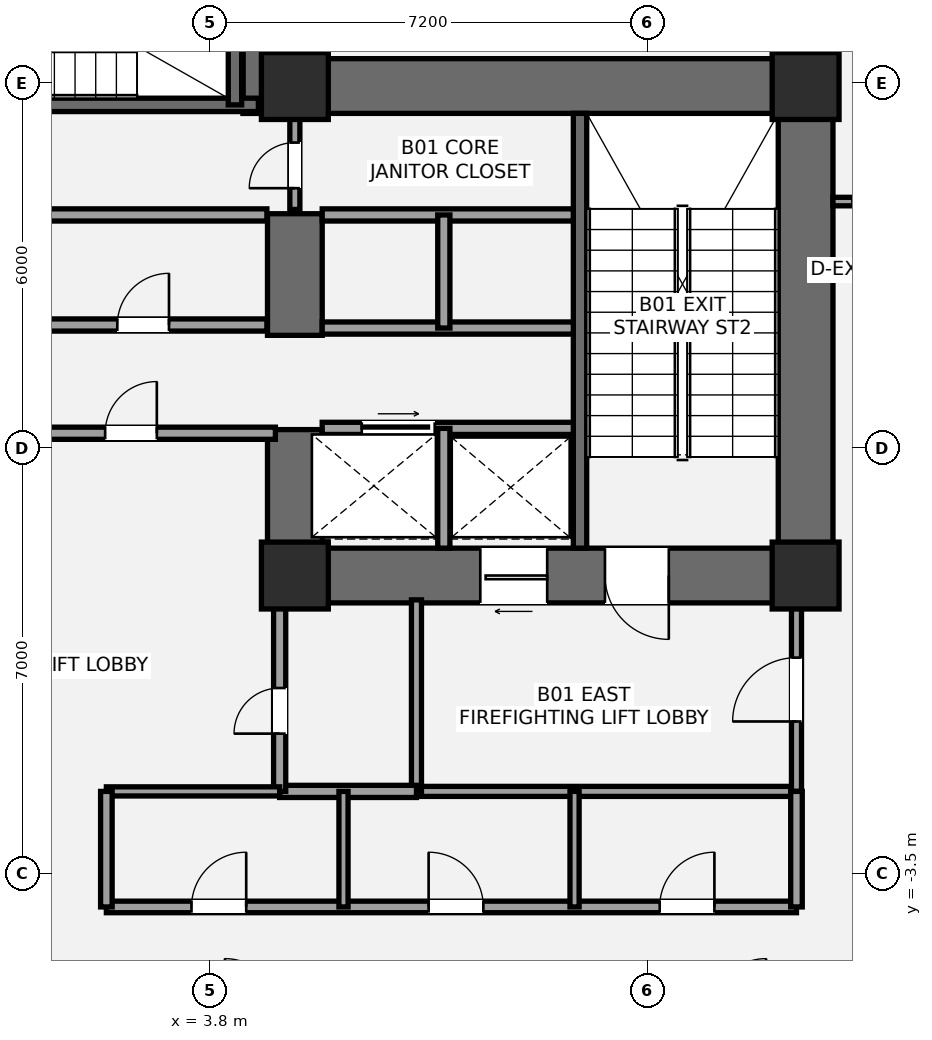
"""IFC4 building model, lengths in metres.
Left out: names, types, materials, properties, quantities, classifications, styles, units other than length and angle.
Written with IfcOpenShell. Run it as: python <this file> out.ifc"""

import sys

from ifc_helpers import new_model, si_unit, direction, frame, frame_2d, origin, origin_2d, place, context, subcontext, project, spatial, rectangle, extrude, element, fill, save


model = new_model("IFC4")
c1 = context("Model", 3, precision=1e-05, world=origin(), true_north=direction((0.0, 1.0)))
c2 = subcontext(c1, "Body", "Model", "MODEL_VIEW")
j1 = project(units=[si_unit("LENGTHUNIT", "METRE"), si_unit("PLANEANGLEUNIT", "RADIAN")], contexts=[c1])
p1 = place(None, origin())
s1 = spatial("IfcSite", under=j1, at=p1, CompositionType="ELEMENT")
p2 = place(p1, origin())
s2 = spatial("IfcBuilding", under=s1, at=p2, CompositionType="ELEMENT")
p3 = place(p2, frame((0.0, 0.0, -4.4)))
s3 = spatial("IfcBuildingStorey", under=s2, at=p3, CompositionType="ELEMENT", Elevation=-4.4)
p4 = place(p3, frame((13.6, 0.95, 0.0), z_axis=(0.0, 0.0, 1.0), x_axis=(0.0, 1.0, 0.0)))
e1 = element("IfcWall", 1, at=p4, inside=s3, PredefinedType="SHEAR", context=c2, shape_type="SweptSolid", body=[
    extrude(rectangle(XDim=8.95, YDim=0.9, at=frame_2d((4.475, 0.0))), origin(), (0.0, 0.0, 1.0), 4.4),
])
p5 = place(p3, frame((4.35, 9.45, 0.0), z_axis=(0.0, 0.0, 1.0), x_axis=(1.0, 0.0, 0.0)))
e2 = element("IfcWall", 2, at=p5, inside=s3, PredefinedType="SHEAR", context=c2, shape_type="SweptSolid", body=[
    extrude(rectangle(XDim=9.7, YDim=0.9, at=frame_2d((4.85, 0.0))), origin(), (0.0, 0.0, 1.0), 4.4),
])
p6 = place(p3, frame((14.05, 1.4, 0.0), z_axis=(0.0, 0.0, 1.0), x_axis=(-1.0, 0.0, 0.0)))
e3 = element("IfcWall", 3, at=p6, inside=s3, PredefinedType="SHEAR", context=c2, shape_type="SweptSolid", body=[
    extrude(rectangle(XDim=9.3, YDim=0.9, at=frame_2d((4.65, 0.0))), origin(), (0.0, 0.0, 1.0), 4.4),
])
p7 = place(p6, frame((2.7, 0.0, 0.0)))
e4 = element("IfcOpeningElement", 4, at=p7, cuts=e3, PredefinedType="OPENING", context=c2, shape_type="SweptSolid", body=[
    extrude(rectangle(XDim=1.05, YDim=2.15, at=frame_2d((0.525, 1.075))), frame((0.0, 0.46, 0.0), z_axis=(0.0, -1.0, 0.0), x_axis=(1.0, 0.0, 0.0)), (0.0, 0.0, 1.0), 0.92),
])
p8 = place(p6, frame((4.7, 0.0, 0.0)))
e5 = element("IfcOpeningElement", 5, at=p8, cuts=e3, PredefinedType="OPENING", context=c2, shape_type="SweptSolid", body=[
    extrude(rectangle(XDim=1.1, YDim=2.2, at=frame_2d((0.55, 1.1))), frame((0.0, 0.46, 0.0), z_axis=(0.0, -1.0, 0.0), x_axis=(1.0, 0.0, 0.0)), (0.0, 0.0, 1.0), 0.92),
])
p9 = place(p3, frame((5.2, 0.95, 0.0), z_axis=(0.0, 0.0, 1.0), x_axis=(0.0, 1.0, 0.0)))
e6 = element("IfcWall", 6, at=p9, inside=s3, PredefinedType="SHEAR", context=c2, shape_type="SweptSolid", body=[
    extrude(rectangle(XDim=2.85, YDim=0.9, at=frame_2d((1.425, 0.0))), origin(), (0.0, 0.0, 1.0), 4.4),
])
p10 = place(p3, frame((5.2, 5.35, 0.0), z_axis=(0.0, 0.0, 1.0), x_axis=(0.0, 1.0, 0.0)))
e7 = element("IfcWall", 7, at=p10, inside=s3, PredefinedType="SHEAR", context=c2, shape_type="SweptSolid", body=[
    extrude(rectangle(XDim=2.0, YDim=0.9, at=frame_2d((1.0, 0.0))), origin(), (0.0, 0.0, 1.0), 4.4),
])
p11 = place(p3, frame((9.89, 1.85, 0.0), z_axis=(0.0, 0.0, 1.0), x_axis=(0.0, 1.0, 0.0)))
e8 = element("IfcWall", 8, at=p11, inside=s3, PredefinedType="SHEAR", context=c2, shape_type="SweptSolid", body=[
    extrude(rectangle(XDim=7.15, YDim=0.22, at=frame_2d((3.575, 0.0))), origin(), (0.0, 0.0, 1.0), 4.4),
])
p12 = place(p3, frame((4.8, 9.0, 0.0), z_axis=(0.0, 0.0, 1.0), x_axis=(0.0, 1.0, 0.0)))
e9 = element("IfcWall", 9, at=p12, inside=s3, PredefinedType="SHEAR", context=c2, shape_type="SweptSolid", body=[
    extrude(rectangle(XDim=4.3, YDim=0.9, at=frame_2d((2.15, 0.0))), origin(), (0.0, 0.0, 1.0), 4.4),
])
p13 = place(p3, frame((-4.7, 9.14, 0.0), z_axis=(0.0, 0.0, 1.0), x_axis=(1.0, 0.0, 0.0)))
e10 = element("IfcWall", 10, at=p13, inside=s3, PredefinedType="SHEAR", context=c2, shape_type="SweptSolid", body=[
    extrude(rectangle(XDim=9.3, YDim=0.22, at=frame_2d((4.65, 0.0))), origin(), (0.0, 0.0, 1.0), 4.4),
])
p14 = place(p13, frame((1.15, 0.0, 0.0)))
e11 = element("IfcOpeningElement", 11, at=p14, cuts=e10, PredefinedType="OPENING", context=c2, shape_type="SweptSolid", body=[
    extrude(rectangle(XDim=1.05, YDim=2.15, at=frame_2d((0.525, 1.075))), frame((0.0, 0.12, 0.0), z_axis=(0.0, -1.0, 0.0), x_axis=(1.0, 0.0, 0.0)), (0.0, 0.0, 1.0), 0.24),
])
p15 = place(p3, frame((4.215, 9.14, 0.0), z_axis=(0.0, 0.0, 1.0), x_axis=(0.0, 1.0, 0.0)))
e12 = element("IfcWall", 12, at=p15, inside=s3, PredefinedType="SHEAR", context=c2, shape_type="SweptSolid", body=[
    extrude(rectangle(XDim=3.26, YDim=0.22, at=frame_2d((1.63, 0.0))), origin(), (0.0, 0.0, 1.0), 4.4),
])
for number, where, z_axis, x_axis in (
    (13, (5.2, 1.4, 0.0), (0.0, 0.0, 1.0), (1.0, 0.0, 0.0)),
    (14, (5.2, 9.45, 0.0), (0.0, 0.0, 1.0), (1.0, 0.0, 0.0)),
    (15, (13.6, 1.4, 0.0), (0.0, 0.0, 1.0), (1.0, 0.0, 0.0)),
    (16, (13.6, 9.45, 0.0), (0.0, 0.0, 1.0), (1.0, 0.0, 0.0)),
):
    element("IfcColumn", number, at=place(p3, frame(where, z_axis=z_axis, x_axis=x_axis)), inside=s3, PredefinedType="COLUMN", context=c2, shape_type="SweptSolid", body=[
        extrude(rectangle(XDim=1.1, YDim=1.1, at=origin_2d()), origin(), (0.0, 0.0, 1.0), 4.4),
    ])
p16 = place(p3, frame((7.2, -2.15, 0.0), z_axis=(0.0, 0.0, 1.0), x_axis=(1.0, 0.0, 0.0)))
e17 = element("IfcWall", 17, at=p16, inside=s3, PredefinedType="PARTITIONING", context=c2, shape_type="SweptSolid", body=[
    extrude(rectangle(XDim=6.25, YDim=0.165, at=frame_2d((3.125, 0.0))), origin(), (0.0, 0.0, 1.0), 4.14),
])
p17 = place(p3, frame((7.2, -2.15, 0.0), z_axis=(0.0, 0.0, 1.0), x_axis=(0.0, 1.0, 0.0)))
e18 = element("IfcWall", 18, at=p17, inside=s3, PredefinedType="PARTITIONING", context=c2, shape_type="SweptSolid", body=[
    extrude(rectangle(XDim=3.15, YDim=0.165, at=frame_2d((1.575, 0.0))), origin(), (0.0, 0.0, 1.0), 4.14),
])
p18 = place(p3, frame((13.45, -2.15, 0.0), z_axis=(0.0, 0.0, 1.0), x_axis=(0.0, 1.0, 0.0)))
e19 = element("IfcWall", 19, at=p18, inside=s3, PredefinedType="PARTITIONING", context=c2, shape_type="SweptSolid", body=[
    extrude(rectangle(XDim=3.15, YDim=0.165, at=frame_2d((1.575, 0.0))), origin(), (0.0, 0.0, 1.0), 4.14),
])
p19 = place(p18, frame((1.15, 0.0, 0.0)))
e20 = element("IfcOpeningElement", 20, at=p19, cuts=e19, PredefinedType="OPENING", context=c2, shape_type="SweptSolid", body=[
    extrude(rectangle(XDim=1.05, YDim=2.15, at=frame_2d((0.525, 1.075))), frame((0.0, 0.093, 0.0), z_axis=(0.0, -1.0, 0.0), x_axis=(1.0, 0.0, 0.0)), (0.0, 0.0, 1.0), 0.185),
])
p20 = place(p3, frame((4.95, -2.15, 0.0), z_axis=(0.0, 0.0, 1.0), x_axis=(1.0, 0.0, 0.0)))
e21 = element("IfcWall", 21, at=p20, inside=s3, PredefinedType="SOLIDWALL", context=c2, shape_type="SweptSolid", body=[
    extrude(rectangle(XDim=2.25, YDim=0.2, at=frame_2d((1.125, 0.0))), origin(), (0.0, 0.0, 1.0), 4.14),
])
p21 = place(p3, frame((4.95, -2.15, 0.0), z_axis=(0.0, 0.0, 1.0), x_axis=(0.0, 1.0, 0.0)))
e22 = element("IfcWall", 22, at=p21, inside=s3, PredefinedType="SOLIDWALL", context=c2, shape_type="SweptSolid", body=[
    extrude(rectangle(XDim=3.15, YDim=0.2, at=frame_2d((1.575, 0.0))), origin(), (0.0, 0.0, 1.0), 3.508),
])
p22 = place(p21, frame((0.95, 0.0, 0.0)))
e23 = element("IfcOpeningElement", 23, at=p22, cuts=e22, PredefinedType="OPENING", context=c2, shape_type="SweptSolid", body=[
    extrude(rectangle(XDim=0.75, YDim=2.1, at=frame_2d((0.375, 1.05))), frame((0.0, 0.11, 0.0), z_axis=(0.0, -1.0, 0.0), x_axis=(1.0, 0.0, 0.0)), (0.0, 0.0, 1.0), 0.22),
])
p23 = place(p3, frame((5.65, 3.82, 0.0), z_axis=(0.0, 0.0, 1.0), x_axis=(1.0, 0.0, 0.0)))
e24 = element("IfcWall", 24, at=p23, inside=s3, PredefinedType="SOLIDWALL", context=c2, shape_type="SweptSolid", body=[
    extrude(rectangle(XDim=4.13, YDim=0.2, at=frame_2d((2.065, 0.0))), origin(), (0.0, 0.0, 1.0), 4.14),
])
p24 = place(p23, frame((0.65, 0.0, 0.0)))
e25 = element("IfcOpeningElement", 25, at=p24, cuts=e24, PredefinedType="OPENING", context=c2, shape_type="SweptSolid", body=[
    extrude(rectangle(XDim=1.2, YDim=2.2, at=frame_2d((0.6, 1.1))), frame((0.0, 0.11, 0.0), z_axis=(0.0, -1.0, 0.0), x_axis=(1.0, 0.0, 0.0)), (0.0, 0.0, 1.0), 0.22),
])
p25 = place(p3, frame((7.65, 1.85, 0.0), z_axis=(0.0, 0.0, 1.0), x_axis=(0.0, 1.0, 0.0)))
e26 = element("IfcWall", 26, at=p25, inside=s3, PredefinedType="SOLIDWALL", context=c2, shape_type="SweptSolid", body=[
    extrude(rectangle(XDim=1.97, YDim=0.2, at=frame_2d((0.985, 0.0))), origin(), (0.0, 0.0, 1.0), 4.14),
])
for number, where, z_axis, x_axis in (
    (27, (5.65, 5.47, 0.0), (0.0, 0.0, 1.0), (1.0, 0.0, 0.0)),
    (28, (5.65, 7.33, 0.0), (0.0, 0.0, 1.0), (1.0, 0.0, 0.0)),
):
    element("IfcWall", number, at=place(p3, frame(where, z_axis=z_axis, x_axis=x_axis)), inside=s3, PredefinedType="SOLIDWALL", context=c2, shape_type="SweptSolid", body=[
        extrude(rectangle(XDim=4.13, YDim=0.2, at=frame_2d((2.065, 0.0))), origin(), (0.0, 0.0, 1.0), 4.14),
    ])
p26 = place(p3, frame((7.65, 5.47, 0.0), z_axis=(0.0, 0.0, 1.0), x_axis=(0.0, 1.0, 0.0)))
e29 = element("IfcWall", 29, at=p26, inside=s3, PredefinedType="SOLIDWALL", context=c2, shape_type="SweptSolid", body=[
    extrude(rectangle(XDim=1.86, YDim=0.2, at=frame_2d((0.93, 0.0))), origin(), (0.0, 0.0, 1.0), 4.14),
])
p27 = place(p3, frame((0.88, 3.74, 0.0), z_axis=(0.0, 0.0, 1.0), x_axis=(1.0, 0.0, 0.0)))
e30 = element("IfcWall", 30, at=p27, inside=s3, PredefinedType="SOLIDWALL", context=c2, shape_type="SweptSolid", body=[
    extrude(rectangle(XDim=4.0, YDim=0.2, at=frame_2d((2.0, 0.0))), origin(), (0.0, 0.0, 1.0), 4.14),
])
p28 = place(p27, frame((1.2, 0.0, 0.0)))
e31 = element("IfcOpeningElement", 31, at=p28, cuts=e30, PredefinedType="OPENING", context=c2, shape_type="SweptSolid", body=[
    extrude(rectangle(XDim=0.85, YDim=2.1, at=frame_2d((0.425, 1.05))), frame((0.0, 0.11, 0.0), z_axis=(0.0, -1.0, 0.0), x_axis=(1.0, 0.0, 0.0)), (0.0, 0.0, 1.0), 0.22),
])
p29 = place(p3, frame((0.88, 5.52, 0.0), z_axis=(0.0, 0.0, 1.0), x_axis=(1.0, 0.0, 0.0)))
e32 = element("IfcWall", 32, at=p29, inside=s3, PredefinedType="SOLIDWALL", context=c2, shape_type="SweptSolid", body=[
    extrude(rectangle(XDim=3.86, YDim=0.2, at=frame_2d((1.93, 0.0))), origin(), (0.0, 0.0, 1.0), 4.14),
])
p30 = place(p29, frame((1.4, 0.0, 0.0)))
e33 = element("IfcOpeningElement", 33, at=p30, cuts=e32, PredefinedType="OPENING", context=c2, shape_type="SweptSolid", body=[
    extrude(rectangle(XDim=0.85, YDim=2.1, at=frame_2d((0.425, 1.05))), frame((0.0, 0.11, 0.0), z_axis=(0.0, -1.0, 0.0), x_axis=(1.0, 0.0, 0.0)), (0.0, 0.0, 1.0), 0.22),
])
p31 = place(p3, frame((0.88, 7.33, 0.0), z_axis=(0.0, 0.0, 1.0), x_axis=(1.0, 0.0, 0.0)))
e34 = element("IfcWall", 34, at=p31, inside=s3, PredefinedType="SOLIDWALL", context=c2, shape_type="SweptSolid", body=[
    extrude(rectangle(XDim=3.86, YDim=0.2, at=frame_2d((1.93, 0.0))), origin(), (0.0, 0.0, 1.0), 4.14),
])
p32 = place(p3, frame((5.2, 7.42, 0.0), z_axis=(0.0, 0.0, 1.0), x_axis=(0.0, 1.0, 0.0)))
e35 = element("IfcWall", 35, at=p32, inside=s3, PredefinedType="PARTITIONING", context=c2, shape_type="SweptSolid", body=[
    extrude(rectangle(XDim=1.58, YDim=0.165, at=frame_2d((0.79, 0.0))), origin(), (0.0, 0.0, 1.0), 4.14),
])
p33 = place(p32, frame((0.35, 0.0, 0.0)))
e36 = element("IfcOpeningElement", 36, at=p33, cuts=e35, PredefinedType="OPENING", context=c2, shape_type="SweptSolid", body=[
    extrude(rectangle(XDim=0.75, YDim=2.1, at=frame_2d((0.375, 1.05))), frame((0.0, 0.093, 0.0), z_axis=(0.0, -1.0, 0.0), x_axis=(1.0, 0.0, 0.0)), (0.0, 0.0, 1.0), 0.185),
])
p34 = place(p3, frame((2.1, -4.05, 0.0), z_axis=(0.0, 0.0, 1.0), x_axis=(1.0, 0.0, 0.0)))
e37 = element("IfcWall", 37, at=p34, inside=s3, PredefinedType="PLUMBINGWALL", context=c2, shape_type="SweptSolid", body=[
    extrude(rectangle(XDim=11.35, YDim=0.19, at=frame_2d((5.675, 0.0))), origin(), (0.0, 0.0, 1.0), 3.667),
])
p35 = place(p34, frame((1.4, 0.0, 0.0)))
e38 = element("IfcOpeningElement", 38, at=p35, cuts=e37, PredefinedType="OPENING", context=c2, shape_type="SweptSolid", body=[
    extrude(rectangle(XDim=0.9, YDim=2.1, at=frame_2d((0.45, 1.05))), frame((0.0, 0.105, 0.0), z_axis=(0.0, -1.0, 0.0), x_axis=(1.0, 0.0, 0.0)), (0.0, 0.0, 1.0), 0.21),
])
p36 = place(p34, frame((5.3, 0.0, 0.0)))
e39 = element("IfcOpeningElement", 39, at=p36, cuts=e37, PredefinedType="OPENING", context=c2, shape_type="SweptSolid", body=[
    extrude(rectangle(XDim=0.9, YDim=2.1, at=frame_2d((0.45, 1.05))), frame((0.0, 0.105, 0.0), z_axis=(0.0, -1.0, 0.0), x_axis=(1.0, 0.0, 0.0)), (0.0, 0.0, 1.0), 0.21),
])
p37 = place(p34, frame((9.1, 0.0, 0.0)))
e40 = element("IfcOpeningElement", 40, at=p37, cuts=e37, PredefinedType="OPENING", context=c2, shape_type="SweptSolid", body=[
    extrude(rectangle(XDim=0.9, YDim=2.1, at=frame_2d((0.45, 1.05))), frame((0.0, 0.105, 0.0), z_axis=(0.0, -1.0, 0.0), x_axis=(1.0, 0.0, 0.0)), (0.0, 0.0, 1.0), 0.21),
])
p38 = place(p3, frame((2.1, -2.15, 0.0), z_axis=(0.0, 0.0, 1.0), x_axis=(1.0, 0.0, 0.0)))
e41 = element("IfcWall", 41, at=p38, inside=s3, PredefinedType="PLUMBINGWALL", context=c2, shape_type="SweptSolid", body=[
    extrude(rectangle(XDim=2.85, YDim=0.15, at=frame_2d((1.425, 0.0))), origin(), (0.0, 0.0, 1.0), 4.14),
])
for number, where, z_axis, x_axis in (
    (42, (2.1, -4.05, 0.0), (0.0, 0.0, 1.0), (0.0, 1.0, 0.0)),
    (43, (13.45, -4.05, 0.0), (0.0, 0.0, 1.0), (0.0, 1.0, 0.0)),
):
    element("IfcWall", number, at=place(p3, frame(where, z_axis=z_axis, x_axis=x_axis)), inside=s3, PredefinedType="PLUMBINGWALL", context=c2, shape_type="SweptSolid", body=[
        extrude(rectangle(XDim=1.9, YDim=0.19, at=frame_2d((0.95, 0.0))), origin(), (0.0, 0.0, 1.0), 4.14),
    ])
p39 = place(p3, frame((6.0, -4.05, 0.0), z_axis=(0.0, 0.0, 1.0), x_axis=(0.0, 1.0, 0.0)))
e44 = element("IfcWall", 44, at=p39, inside=s3, PredefinedType="PLUMBINGWALL", context=c2, shape_type="SweptSolid", body=[
    extrude(rectangle(XDim=1.9, YDim=0.15, at=frame_2d((0.95, 0.0))), origin(), (0.0, 0.0, 1.0), 3.508),
])
p40 = place(p3, frame((9.8, -4.05, 0.0), z_axis=(0.0, 0.0, 1.0), x_axis=(0.0, 1.0, 0.0)))
e45 = element("IfcWall", 45, at=p40, inside=s3, PredefinedType="PLUMBINGWALL", context=c2, shape_type="SweptSolid", body=[
    extrude(rectangle(XDim=1.9, YDim=0.15, at=frame_2d((0.95, 0.0))), origin(), (0.0, 0.0, 1.0), 4.14),
])
p41 = place(p3, frame((14.05, 7.55, 0.0), z_axis=(0.0, 0.0, 1.0), x_axis=(1.0, 0.0, 0.0)))
e46 = element("IfcWall", 46, at=p41, inside=s3, PredefinedType="PARTITIONING", context=c2, shape_type="SweptSolid", body=[
    extrude(rectangle(XDim=1.95, YDim=0.14, at=frame_2d((0.975, 0.0))), origin(), (0.0, 0.0, 1.0), 4.14),
])
p42 = place(p41, frame((0.32, 0.0, 0.0)))
e47 = element("IfcOpeningElement", 47, at=p42, cuts=e46, PredefinedType="OPENING", context=c2, shape_type="SweptSolid", body=[
    extrude(rectangle(XDim=0.92, YDim=2.15, at=frame_2d((0.46, 1.075))), frame((0.0, 0.08, 0.0), z_axis=(0.0, -1.0, 0.0), x_axis=(1.0, 0.0, 0.0)), (0.0, 0.0, 1.0), 0.16),
])
p43 = place(p7, origin())
e48 = element("IfcDoor", 48, at=p43, inside=s3, OperationType="SINGLE_SWING_LEFT", PredefinedType="DOOR", context=c2, shape_type="SweptSolid", body=[
    extrude(rectangle(XDim=1.05, YDim=2.15, at=frame_2d((0.525, 1.075))), frame((0.0, 0.025, 0.0), z_axis=(0.0, -1.0, 0.0), x_axis=(1.0, 0.0, 0.0)), (0.0, 0.0, 1.0), 0.05),
])
fill(e4, e48)
p44 = place(p19, origin())
e49 = element("IfcDoor", 49, at=p44, inside=s3, OperationType="SINGLE_SWING_LEFT", PredefinedType="DOOR", context=c2, shape_type="SweptSolid", body=[
    extrude(rectangle(XDim=1.05, YDim=2.15, at=frame_2d((0.525, 1.075))), frame((0.0, 0.025, 0.0), z_axis=(0.0, -1.0, 0.0), x_axis=(1.0, 0.0, 0.0)), (0.0, 0.0, 1.0), 0.05),
])
fill(e20, e49)
p45 = place(p22, origin())
e50 = element("IfcDoor", 50, at=p45, inside=s3, OperationType="SINGLE_SWING_LEFT", PredefinedType="DOOR", context=c2, shape_type="SweptSolid", body=[
    extrude(rectangle(XDim=0.75, YDim=2.1, at=frame_2d((0.375, 1.05))), frame((0.0, 0.025, 0.0), z_axis=(0.0, -1.0, 0.0), x_axis=(1.0, 0.0, 0.0)), (0.0, 0.0, 1.0), 0.05),
])
fill(e23, e50)
p46 = place(p8, origin())
e51 = element("IfcDoor", 51, at=p46, inside=s3, OperationType="SLIDING_TO_LEFT", PredefinedType="DOOR", context=c2, shape_type="SweptSolid", body=[
    extrude(rectangle(XDim=1.1, YDim=2.2, at=frame_2d((0.55, 1.1))), frame((0.0, 0.025, 0.0), z_axis=(0.0, -1.0, 0.0), x_axis=(1.0, 0.0, 0.0)), (0.0, 0.0, 1.0), 0.05),
])
fill(e5, e51)
p47 = place(p24, origin())
e52 = element("IfcDoor", 52, at=p47, inside=s3, OperationType="SLIDING_TO_RIGHT", PredefinedType="DOOR", context=c2, shape_type="SweptSolid", body=[
    extrude(rectangle(XDim=1.2, YDim=2.2, at=frame_2d((0.6, 1.1))), frame((0.0, 0.025, 0.0), z_axis=(0.0, -1.0, 0.0), x_axis=(1.0, 0.0, 0.0)), (0.0, 0.0, 1.0), 0.05),
])
fill(e25, e52)
p48 = place(p28, origin())
e53 = element("IfcDoor", 53, at=p48, inside=s3, OperationType="SINGLE_SWING_RIGHT", PredefinedType="DOOR", context=c2, shape_type="SweptSolid", body=[
    extrude(rectangle(XDim=0.85, YDim=2.1, at=frame_2d((0.425, 1.05))), frame((0.0, 0.025, 0.0), z_axis=(0.0, -1.0, 0.0), x_axis=(1.0, 0.0, 0.0)), (0.0, 0.0, 1.0), 0.05),
])
fill(e31, e53)
p49 = place(p30, origin())
e54 = element("IfcDoor", 54, at=p49, inside=s3, OperationType="SINGLE_SWING_RIGHT", PredefinedType="DOOR", context=c2, shape_type="SweptSolid", body=[
    extrude(rectangle(XDim=0.85, YDim=2.1, at=frame_2d((0.425, 1.05))), frame((0.0, 0.025, 0.0), z_axis=(0.0, -1.0, 0.0), x_axis=(1.0, 0.0, 0.0)), (0.0, 0.0, 1.0), 0.05),
])
fill(e33, e54)
p50 = place(p33, origin())
e55 = element("IfcDoor", 55, at=p50, inside=s3, OperationType="SINGLE_SWING_LEFT", PredefinedType="DOOR", context=c2, shape_type="SweptSolid", body=[
    extrude(rectangle(XDim=0.75, YDim=2.1, at=frame_2d((0.375, 1.05))), frame((0.0, 0.025, 0.0), z_axis=(0.0, -1.0, 0.0), x_axis=(1.0, 0.0, 0.0)), (0.0, 0.0, 1.0), 0.05),
])
fill(e36, e55)
p51 = place(p35, origin())
e56 = element("IfcDoor", 56, at=p51, inside=s3, OperationType="SINGLE_SWING_RIGHT", PredefinedType="DOOR", context=c2, shape_type="SweptSolid", body=[
    extrude(rectangle(XDim=0.9, YDim=2.1, at=frame_2d((0.45, 1.05))), frame((0.0, 0.025, 0.0), z_axis=(0.0, -1.0, 0.0), x_axis=(1.0, 0.0, 0.0)), (0.0, 0.0, 1.0), 0.05),
])
fill(e38, e56)
p52 = place(p36, origin())
e57 = element("IfcDoor", 57, at=p52, inside=s3, OperationType="SINGLE_SWING_LEFT", PredefinedType="DOOR", context=c2, shape_type="SweptSolid", body=[
    extrude(rectangle(XDim=0.9, YDim=2.1, at=frame_2d((0.45, 1.05))), frame((0.0, 0.025, 0.0), z_axis=(0.0, -1.0, 0.0), x_axis=(1.0, 0.0, 0.0)), (0.0, 0.0, 1.0), 0.05),
])
fill(e39, e57)
p53 = place(p37, origin())
e58 = element("IfcDoor", 58, at=p53, inside=s3, OperationType="SINGLE_SWING_RIGHT", PredefinedType="DOOR", context=c2, shape_type="SweptSolid", body=[
    extrude(rectangle(XDim=0.9, YDim=2.1, at=frame_2d((0.45, 1.05))), frame((0.0, 0.025, 0.0), z_axis=(0.0, -1.0, 0.0), x_axis=(1.0, 0.0, 0.0)), (0.0, 0.0, 1.0), 0.05),
])
fill(e40, e58)
save(model, sys.argv[1])
